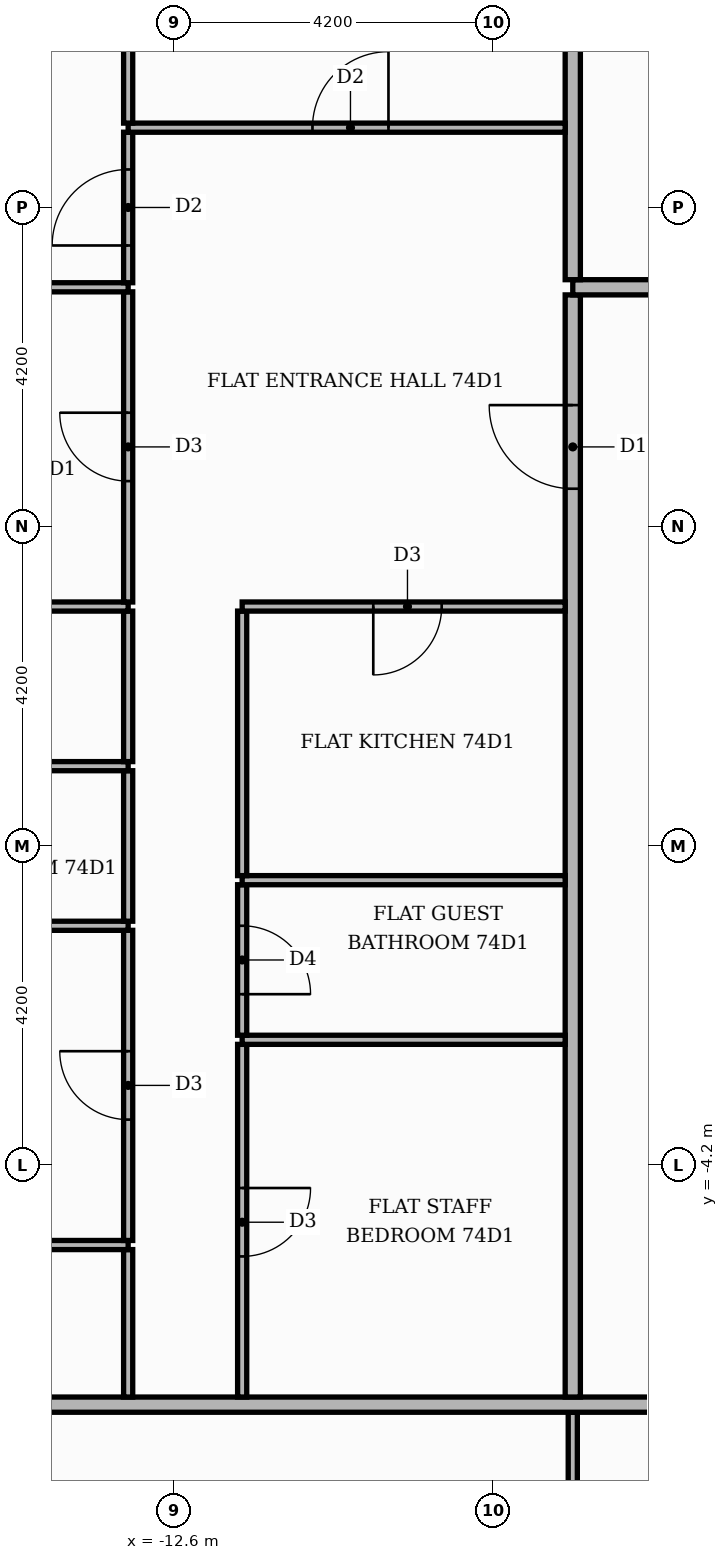
"""IFC4 building model, lengths in metres.
Left out: names, types, materials, properties, quantities, classifications, styles, units other than length and angle.
Written with IfcOpenShell. Run it as: python <this file> out.ifc"""

import sys

from ifc_helpers import new_model, si_unit, direction, frame, frame_2d, origin, place, context, subcontext, project, spatial, rectangle, extrude, element, fill, save


model = new_model("IFC4")
c1 = context("Model", 3, precision=1e-05, world=origin(), true_north=direction((0.0, 1.0)))
c2 = subcontext(c1, "Body", "Model", "MODEL_VIEW")
j1 = project(units=[si_unit("LENGTHUNIT", "METRE"), si_unit("PLANEANGLEUNIT", "RADIAN")], contexts=[c1])
p1 = place(None, origin())
s1 = spatial("IfcSite", under=j1, at=p1, CompositionType="ELEMENT")
p2 = place(p1, origin())
s2 = spatial("IfcBuilding", under=s1, at=p2, CompositionType="ELEMENT")
p3 = place(p2, frame((0.0, 0.0, 308.4)))
s3 = spatial("IfcBuildingStorey", under=s2, at=p3, CompositionType="ELEMENT", Elevation=308.4)
p4 = place(p3, frame((-7.35, -13.44, 0.0), z_axis=(0.0, 0.0, 1.0), x_axis=(0.0, 1.0, 0.0)))
e1 = element("IfcWall", 1, at=p4, inside=s3, PredefinedType="PARTITIONING", context=c2, shape_type="SweptSolid", body=[
    extrude(rectangle(XDim=5.99, YDim=0.12, at=frame_2d((2.995, 0.0))), origin(), (0.0, 0.0, 1.0), 3.55),
])
p5 = place(p4, frame((2.565, 0.0, 0.0)))
e2 = element("IfcOpeningElement", 2, at=p5, cuts=e1, PredefinedType="OPENING", context=c2, shape_type="SweptSolid", body=[
    extrude(rectangle(XDim=0.9, YDim=2.1, at=frame_2d((0.45, 1.05))), frame((0.0, 0.07, 0.0), z_axis=(0.0, -1.0, 0.0), x_axis=(1.0, 0.0, 0.0)), (0.0, 0.0, 1.0), 0.14),
])
p6 = place(p3, frame((-18.5, -7.35, 0.0), z_axis=(0.0, 0.0, 1.0), x_axis=(1.0, 0.0, 0.0)))
e3 = element("IfcWall", 3, at=p6, inside=s3, PredefinedType="PARTITIONING", context=c2, shape_type="SweptSolid", body=[
    extrude(rectangle(XDim=25.85, YDim=0.2, at=frame_2d((12.925, 0.0))), origin(), (0.0, 0.0, 1.0), 3.55),
])
p7 = place(p6, frame((13.75, 0.0, 0.0)))
e4 = element("IfcOpeningElement", 4, at=p7, cuts=e3, PredefinedType="OPENING", context=c2, shape_type="SweptSolid", body=[
    extrude(rectangle(XDim=1.1, YDim=2.4, at=frame_2d((0.55, 1.2))), frame((0.0, 0.11, 0.0), z_axis=(0.0, -1.0, 0.0), x_axis=(1.0, 0.0, 0.0)), (0.0, 0.0, 1.0), 0.22),
])
p8 = place(p3, frame((-13.2, -7.25, 0.0), z_axis=(0.0, 0.0, 1.0), x_axis=(0.0, 1.0, 0.0)))
e5 = element("IfcWall", 5, at=p8, inside=s3, PredefinedType="PARTITIONING", context=c2, shape_type="SweptSolid", body=[
    extrude(rectangle(XDim=1.94, YDim=0.12, at=frame_2d((0.97, 0.0))), origin(), (0.0, 0.0, 1.0), 3.55),
])
p9 = place(p3, frame((-11.7, -7.25, 0.0), z_axis=(0.0, 0.0, 1.0), x_axis=(0.0, 1.0, 0.0)))
e6 = element("IfcWall", 6, at=p9, inside=s3, PredefinedType="PARTITIONING", context=c2, shape_type="SweptSolid", body=[
    extrude(rectangle(XDim=4.64, YDim=0.12, at=frame_2d((2.32, 0.0))), origin(), (0.0, 0.0, 1.0), 3.55),
])
p10 = place(p9, frame((1.85, 0.0, 0.0)))
e7 = element("IfcOpeningElement", 7, at=p10, cuts=e6, PredefinedType="OPENING", context=c2, shape_type="SweptSolid", body=[
    extrude(rectangle(XDim=0.9, YDim=2.1, at=frame_2d((0.45, 1.05))), frame((0.0, 0.07, 0.0), z_axis=(0.0, -1.0, 0.0), x_axis=(1.0, 0.0, 0.0)), (0.0, 0.0, 1.0), 0.14),
])
p11 = place(p3, frame((-7.35, -7.25, 0.0), z_axis=(0.0, 0.0, 1.0), x_axis=(0.0, 1.0, 0.0)))
e8 = element("IfcWall", 8, at=p11, inside=s3, PredefinedType="PARTITIONING", context=c2, shape_type="SweptSolid", body=[
    extrude(rectangle(XDim=14.5, YDim=0.2, at=frame_2d((7.25, 0.0))), origin(), (0.0, 0.0, 1.0), 3.55),
])
p12 = place(p11, frame((11.95, 0.0, 0.0)))
e9 = element("IfcOpeningElement", 9, at=p12, cuts=e8, PredefinedType="OPENING", context=c2, shape_type="SweptSolid", body=[
    extrude(rectangle(XDim=1.1, YDim=2.4, at=frame_2d((0.55, 1.2))), frame((0.0, 0.11, 0.0), z_axis=(0.0, -1.0, 0.0), x_axis=(1.0, 0.0, 0.0)), (0.0, 0.0, 1.0), 0.22),
])
p13 = place(p3, frame((-18.5, -5.25, 0.0), z_axis=(0.0, 0.0, 1.0), x_axis=(1.0, 0.0, 0.0)))
e10 = element("IfcWall", 10, at=p13, inside=s3, PredefinedType="PARTITIONING", context=c2, shape_type="SweptSolid", body=[
    extrude(rectangle(XDim=5.3, YDim=0.12, at=frame_2d((2.65, 0.0))), origin(), (0.0, 0.0, 1.0), 3.55),
])
p14 = place(p13, frame((2.05, 0.0, 0.0)))
e11 = element("IfcOpeningElement", 11, at=p14, cuts=e10, PredefinedType="OPENING", context=c2, shape_type="SweptSolid", body=[
    extrude(rectangle(XDim=0.9, YDim=2.1, at=frame_2d((0.45, 1.05))), frame((0.0, 0.07, 0.0), z_axis=(0.0, -1.0, 0.0), x_axis=(1.0, 0.0, 0.0)), (0.0, 0.0, 1.0), 0.14),
])
p15 = place(p3, frame((-13.2, -5.19, 0.0), z_axis=(0.0, 0.0, 1.0), x_axis=(0.0, 1.0, 0.0)))
e12 = element("IfcWall", 12, at=p15, inside=s3, PredefinedType="PARTITIONING", context=c2, shape_type="SweptSolid", body=[
    extrude(rectangle(XDim=4.08, YDim=0.12, at=frame_2d((2.04, 0.0))), origin(), (0.0, 0.0, 1.0), 3.55),
])
p16 = place(p15, frame((1.59, 0.0, 0.0)))
e13 = element("IfcOpeningElement", 13, at=p16, cuts=e12, PredefinedType="OPENING", context=c2, shape_type="SweptSolid", body=[
    extrude(rectangle(XDim=0.9, YDim=2.1, at=frame_2d((0.45, 1.05))), frame((0.0, 0.07, 0.0), z_axis=(0.0, -1.0, 0.0), x_axis=(1.0, 0.0, 0.0)), (0.0, 0.0, 1.0), 0.14),
])
p17 = place(p3, frame((-11.7, -2.55, 0.0), z_axis=(0.0, 0.0, 1.0), x_axis=(1.0, 0.0, 0.0)))
e14 = element("IfcWall", 14, at=p17, inside=s3, PredefinedType="PARTITIONING", context=c2, shape_type="SweptSolid", body=[
    extrude(rectangle(XDim=4.25, YDim=0.12, at=frame_2d((2.125, 0.0))), origin(), (0.0, 0.0, 1.0), 3.55),
])
p18 = place(p3, frame((-11.7, -2.49, 0.0), z_axis=(0.0, 0.0, 1.0), x_axis=(0.0, 1.0, 0.0)))
e15 = element("IfcWall", 15, at=p18, inside=s3, PredefinedType="PARTITIONING", context=c2, shape_type="SweptSolid", body=[
    extrude(rectangle(XDim=1.98, YDim=0.12, at=frame_2d((0.99, 0.0))), origin(), (0.0, 0.0, 1.0), 3.55),
])
p19 = place(p18, frame((0.54, 0.0, 0.0)))
e16 = element("IfcOpeningElement", 16, at=p19, cuts=e15, PredefinedType="OPENING", context=c2, shape_type="SweptSolid", body=[
    extrude(rectangle(XDim=0.9, YDim=2.1, at=frame_2d((0.45, 1.05))), frame((0.0, 0.07, 0.0), z_axis=(0.0, -1.0, 0.0), x_axis=(1.0, 0.0, 0.0)), (0.0, 0.0, 1.0), 0.14),
])
p20 = place(p3, frame((-16.949, -1.05, 0.0), z_axis=(0.0, 0.0, 1.0), x_axis=(1.0, 0.0, 0.0)))
e17 = element("IfcWall", 17, at=p20, inside=s3, PredefinedType="PARTITIONING", context=c2, shape_type="SweptSolid", body=[
    extrude(rectangle(XDim=3.749, YDim=0.12, at=frame_2d((1.875, 0.0))), origin(), (0.0, 0.0, 1.0), 3.55),
])
p21 = place(p3, frame((-13.2, -0.99, 0.0), z_axis=(0.0, 0.0, 1.0), x_axis=(0.0, 1.0, 0.0)))
e18 = element("IfcWall", 18, at=p21, inside=s3, PredefinedType="PARTITIONING", context=c2, shape_type="SweptSolid", body=[
    extrude(rectangle(XDim=1.98, YDim=0.12, at=frame_2d((0.99, 0.0))), origin(), (0.0, 0.0, 1.0), 3.55),
])
p22 = place(p3, frame((-11.7, -0.45, 0.0), z_axis=(0.0, 0.0, 1.0), x_axis=(1.0, 0.0, 0.0)))
e19 = element("IfcWall", 19, at=p22, inside=s3, PredefinedType="PARTITIONING", context=c2, shape_type="SweptSolid", body=[
    extrude(rectangle(XDim=4.25, YDim=0.12, at=frame_2d((2.125, 0.0))), origin(), (0.0, 0.0, 1.0), 3.55),
])
p23 = place(p3, frame((-11.7, -0.39, 0.0), z_axis=(0.0, 0.0, 1.0), x_axis=(0.0, 1.0, 0.0)))
e20 = element("IfcWall", 20, at=p23, inside=s3, PredefinedType="PARTITIONING", context=c2, shape_type="SweptSolid", body=[
    extrude(rectangle(XDim=3.48, YDim=0.12, at=frame_2d((1.74, 0.0))), origin(), (0.0, 0.0, 1.0), 3.55),
])
p24 = place(p3, frame((-16.949, 1.05, 0.0), z_axis=(0.0, 0.0, 1.0), x_axis=(1.0, 0.0, 0.0)))
e21 = element("IfcWall", 21, at=p24, inside=s3, PredefinedType="PARTITIONING", context=c2, shape_type="SweptSolid", body=[
    extrude(rectangle(XDim=3.749, YDim=0.12, at=frame_2d((1.875, 0.0))), origin(), (0.0, 0.0, 1.0), 3.55),
])
p25 = place(p24, frame((1.425, 0.0, 0.0)))
e22 = element("IfcOpeningElement", 22, at=p25, cuts=e21, PredefinedType="OPENING", context=c2, shape_type="SweptSolid", body=[
    extrude(rectangle(XDim=0.9, YDim=2.1, at=frame_2d((0.45, 1.05))), frame((0.0, 0.07, 0.0), z_axis=(0.0, -1.0, 0.0), x_axis=(1.0, 0.0, 0.0)), (0.0, 0.0, 1.0), 0.14),
])
p26 = place(p3, frame((-13.2, 1.11, 0.0), z_axis=(0.0, 0.0, 1.0), x_axis=(0.0, 1.0, 0.0)))
e23 = element("IfcWall", 23, at=p26, inside=s3, PredefinedType="PARTITIONING", context=c2, shape_type="SweptSolid", body=[
    extrude(rectangle(XDim=1.98, YDim=0.12, at=frame_2d((0.99, 0.0))), origin(), (0.0, 0.0, 1.0), 3.55),
])
p27 = place(p3, frame((-18.5, 3.15, 0.0), z_axis=(0.0, 0.0, 1.0), x_axis=(1.0, 0.0, 0.0)))
e24 = element("IfcWall", 24, at=p27, inside=s3, PredefinedType="PARTITIONING", context=c2, shape_type="SweptSolid", body=[
    extrude(rectangle(XDim=5.3, YDim=0.12, at=frame_2d((2.65, 0.0))), origin(), (0.0, 0.0, 1.0), 3.55),
])
p28 = place(p27, frame((2.05, 0.0, 0.0)))
e25 = element("IfcOpeningElement", 25, at=p28, cuts=e24, PredefinedType="OPENING", context=c2, shape_type="SweptSolid", body=[
    extrude(rectangle(XDim=0.9, YDim=2.1, at=frame_2d((0.45, 1.05))), frame((0.0, 0.07, 0.0), z_axis=(0.0, -1.0, 0.0), x_axis=(1.0, 0.0, 0.0)), (0.0, 0.0, 1.0), 0.14),
])
p29 = place(p3, frame((-11.7, 3.15, 0.0), z_axis=(0.0, 0.0, 1.0), x_axis=(1.0, 0.0, 0.0)))
e26 = element("IfcWall", 26, at=p29, inside=s3, PredefinedType="PARTITIONING", context=c2, shape_type="SweptSolid", body=[
    extrude(rectangle(XDim=4.25, YDim=0.12, at=frame_2d((2.125, 0.0))), origin(), (0.0, 0.0, 1.0), 3.55),
])
p30 = place(p29, frame((1.725, 0.0, 0.0)))
e27 = element("IfcOpeningElement", 27, at=p30, cuts=e26, PredefinedType="OPENING", context=c2, shape_type="SweptSolid", body=[
    extrude(rectangle(XDim=0.9, YDim=2.1, at=frame_2d((0.45, 1.05))), frame((0.0, 0.07, 0.0), z_axis=(0.0, -1.0, 0.0), x_axis=(1.0, 0.0, 0.0)), (0.0, 0.0, 1.0), 0.14),
])
p31 = place(p3, frame((-13.2, 3.21, 0.0), z_axis=(0.0, 0.0, 1.0), x_axis=(0.0, 1.0, 0.0)))
e28 = element("IfcWall", 28, at=p31, inside=s3, PredefinedType="PARTITIONING", context=c2, shape_type="SweptSolid", body=[
    extrude(rectangle(XDim=4.08, YDim=0.12, at=frame_2d((2.04, 0.0))), origin(), (0.0, 0.0, 1.0), 3.55),
])
p32 = place(p31, frame((1.59, 0.0, 0.0)))
e29 = element("IfcOpeningElement", 29, at=p32, cuts=e28, PredefinedType="OPENING", context=c2, shape_type="SweptSolid", body=[
    extrude(rectangle(XDim=0.9, YDim=2.1, at=frame_2d((0.45, 1.05))), frame((0.0, 0.07, 0.0), z_axis=(0.0, -1.0, 0.0), x_axis=(1.0, 0.0, 0.0)), (0.0, 0.0, 1.0), 0.14),
])
p33 = place(p3, frame((-18.5, 7.35, 0.0), z_axis=(0.0, 0.0, 1.0), x_axis=(1.0, 0.0, 0.0)))
e30 = element("IfcWall", 30, at=p33, inside=s3, PredefinedType="PARTITIONING", context=c2, shape_type="SweptSolid", body=[
    extrude(rectangle(XDim=5.3, YDim=0.12, at=frame_2d((2.65, 0.0))), origin(), (0.0, 0.0, 1.0), 3.55),
])
p34 = place(p3, frame((-7.35, 7.35, 0.0), z_axis=(0.0, 0.0, 1.0), x_axis=(1.0, 0.0, 0.0)))
e31 = element("IfcWall", 31, at=p34, inside=s3, PredefinedType="PARTITIONING", context=c2, shape_type="SweptSolid", body=[
    extrude(rectangle(XDim=1.85, YDim=0.2, at=frame_2d((0.925, 0.0))), origin(), (0.0, 0.0, 1.0), 3.55),
])
p35 = place(p3, frame((-13.2, 7.41, 0.0), z_axis=(0.0, 0.0, 1.0), x_axis=(0.0, 1.0, 0.0)))
e32 = element("IfcWall", 32, at=p35, inside=s3, PredefinedType="PARTITIONING", context=c2, shape_type="SweptSolid", body=[
    extrude(rectangle(XDim=1.98, YDim=0.12, at=frame_2d((0.99, 0.0))), origin(), (0.0, 0.0, 1.0), 3.55),
])
p36 = place(p35, frame((0.49, 0.0, 0.0)))
e33 = element("IfcOpeningElement", 33, at=p36, cuts=e32, PredefinedType="OPENING", context=c2, shape_type="SweptSolid", body=[
    extrude(rectangle(XDim=1.0, YDim=2.1, at=frame_2d((0.5, 1.05))), frame((0.0, 0.07, 0.0), z_axis=(0.0, -1.0, 0.0), x_axis=(1.0, 0.0, 0.0)), (0.0, 0.0, 1.0), 0.14),
])
p37 = place(p3, frame((-7.35, 7.45, 0.0), z_axis=(0.0, 0.0, 1.0), x_axis=(0.0, 1.0, 0.0)))
e34 = element("IfcWall", 34, at=p37, inside=s3, PredefinedType="PARTITIONING", context=c2, shape_type="SweptSolid", body=[
    extrude(rectangle(XDim=11.05, YDim=0.2, at=frame_2d((5.525, 0.0))), origin(), (0.0, 0.0, 1.0), 3.55),
])
p38 = place(p3, frame((-13.2, 9.45, 0.0), z_axis=(0.0, 0.0, 1.0), x_axis=(1.0, 0.0, 0.0)))
e35 = element("IfcWall", 35, at=p38, inside=s3, PredefinedType="PARTITIONING", context=c2, shape_type="SweptSolid", body=[
    extrude(rectangle(XDim=5.75, YDim=0.12, at=frame_2d((2.875, 0.0))), origin(), (0.0, 0.0, 1.0), 3.55),
])
p39 = place(p38, frame((2.425, 0.0, 0.0)))
e36 = element("IfcOpeningElement", 36, at=p39, cuts=e35, PredefinedType="OPENING", context=c2, shape_type="SweptSolid", body=[
    extrude(rectangle(XDim=1.0, YDim=2.1, at=frame_2d((0.5, 1.05))), frame((0.0, 0.07, 0.0), z_axis=(0.0, -1.0, 0.0), x_axis=(1.0, 0.0, 0.0)), (0.0, 0.0, 1.0), 0.14),
])
p40 = place(p3, frame((-13.2, 9.51, 0.0), z_axis=(0.0, 0.0, 1.0), x_axis=(0.0, 1.0, 0.0)))
e37 = element("IfcWall", 37, at=p40, inside=s3, PredefinedType="PARTITIONING", context=c2, shape_type="SweptSolid", body=[
    extrude(rectangle(XDim=2.59, YDim=0.12, at=frame_2d((1.295, 0.0))), origin(), (0.0, 0.0, 1.0), 3.55),
])
p41 = place(p12, origin())
e38 = element("IfcDoor", 38, at=p41, inside=s3, OperationType="SINGLE_SWING_RIGHT", PredefinedType="DOOR", context=c2, shape_type="SweptSolid", body=[
    extrude(rectangle(XDim=1.1, YDim=2.4, at=frame_2d((0.55, 1.2))), frame((0.0, 0.025, 0.0), z_axis=(0.0, -1.0, 0.0), x_axis=(1.0, 0.0, 0.0)), (0.0, 0.0, 1.0), 0.05),
])
fill(e9, e38)
p42 = place(p39, origin())
e39 = element("IfcDoor", 39, at=p42, inside=s3, OperationType="SINGLE_SWING_RIGHT", PredefinedType="DOOR", context=c2, shape_type="SweptSolid", body=[
    extrude(rectangle(XDim=1.0, YDim=2.1, at=frame_2d((0.5, 1.05))), frame((0.0, 0.025, 0.0), z_axis=(0.0, -1.0, 0.0), x_axis=(1.0, 0.0, 0.0)), (0.0, 0.0, 1.0), 0.05),
])
fill(e36, e39)
p43 = place(p30, frame((0.9, 0.0, 0.0), z_axis=(0.0, 0.0, 1.0), x_axis=(-1.0, 0.0, 0.0)))
e40 = element("IfcDoor", 40, at=p43, inside=s3, OperationType="SINGLE_SWING_LEFT", PredefinedType="DOOR", context=c2, shape_type="SweptSolid", body=[
    extrude(rectangle(XDim=0.9, YDim=2.1, at=frame_2d((0.45, 1.05))), frame((0.0, 0.025, 0.0), z_axis=(0.0, -1.0, 0.0), x_axis=(1.0, 0.0, 0.0)), (0.0, 0.0, 1.0), 0.05),
])
fill(e27, e40)
p44 = place(p19, frame((0.9, 0.0, 0.0), z_axis=(0.0, 0.0, 1.0), x_axis=(-1.0, 0.0, 0.0)))
e41 = element("IfcDoor", 41, at=p44, inside=s3, OperationType="SINGLE_SWING_LEFT", PredefinedType="DOOR", context=c2, shape_type="SweptSolid", body=[
    extrude(rectangle(XDim=0.9, YDim=2.1, at=frame_2d((0.45, 1.05))), frame((0.0, 0.025, 0.0), z_axis=(0.0, -1.0, 0.0), x_axis=(1.0, 0.0, 0.0)), (0.0, 0.0, 1.0), 0.05),
])
fill(e16, e41)
p45 = place(p10, frame((0.9, 0.0, 0.0), z_axis=(0.0, 0.0, 1.0), x_axis=(-1.0, 0.0, 0.0)))
e42 = element("IfcDoor", 42, at=p45, inside=s3, OperationType="SINGLE_SWING_RIGHT", PredefinedType="DOOR", context=c2, shape_type="SweptSolid", body=[
    extrude(rectangle(XDim=0.9, YDim=2.1, at=frame_2d((0.45, 1.05))), frame((0.0, 0.025, 0.0), z_axis=(0.0, -1.0, 0.0), x_axis=(1.0, 0.0, 0.0)), (0.0, 0.0, 1.0), 0.05),
])
fill(e7, e42)
p46 = place(p36, origin())
e43 = element("IfcDoor", 43, at=p46, inside=s3, OperationType="SINGLE_SWING_LEFT", PredefinedType="DOOR", context=c2, shape_type="SweptSolid", body=[
    extrude(rectangle(XDim=1.0, YDim=2.1, at=frame_2d((0.5, 1.05))), frame((0.0, 0.025, 0.0), z_axis=(0.0, -1.0, 0.0), x_axis=(1.0, 0.0, 0.0)), (0.0, 0.0, 1.0), 0.05),
])
fill(e33, e43)
p47 = place(p32, origin())
e44 = element("IfcDoor", 44, at=p47, inside=s3, OperationType="SINGLE_SWING_RIGHT", PredefinedType="DOOR", context=c2, shape_type="SweptSolid", body=[
    extrude(rectangle(XDim=0.9, YDim=2.1, at=frame_2d((0.45, 1.05))), frame((0.0, 0.025, 0.0), z_axis=(0.0, -1.0, 0.0), x_axis=(1.0, 0.0, 0.0)), (0.0, 0.0, 1.0), 0.05),
])
fill(e29, e44)
p48 = place(p16, origin())
e45 = element("IfcDoor", 45, at=p48, inside=s3, OperationType="SINGLE_SWING_RIGHT", PredefinedType="DOOR", context=c2, shape_type="SweptSolid", body=[
    extrude(rectangle(XDim=0.9, YDim=2.1, at=frame_2d((0.45, 1.05))), frame((0.0, 0.025, 0.0), z_axis=(0.0, -1.0, 0.0), x_axis=(1.0, 0.0, 0.0)), (0.0, 0.0, 1.0), 0.05),
])
fill(e13, e45)
save(model, sys.argv[1])
